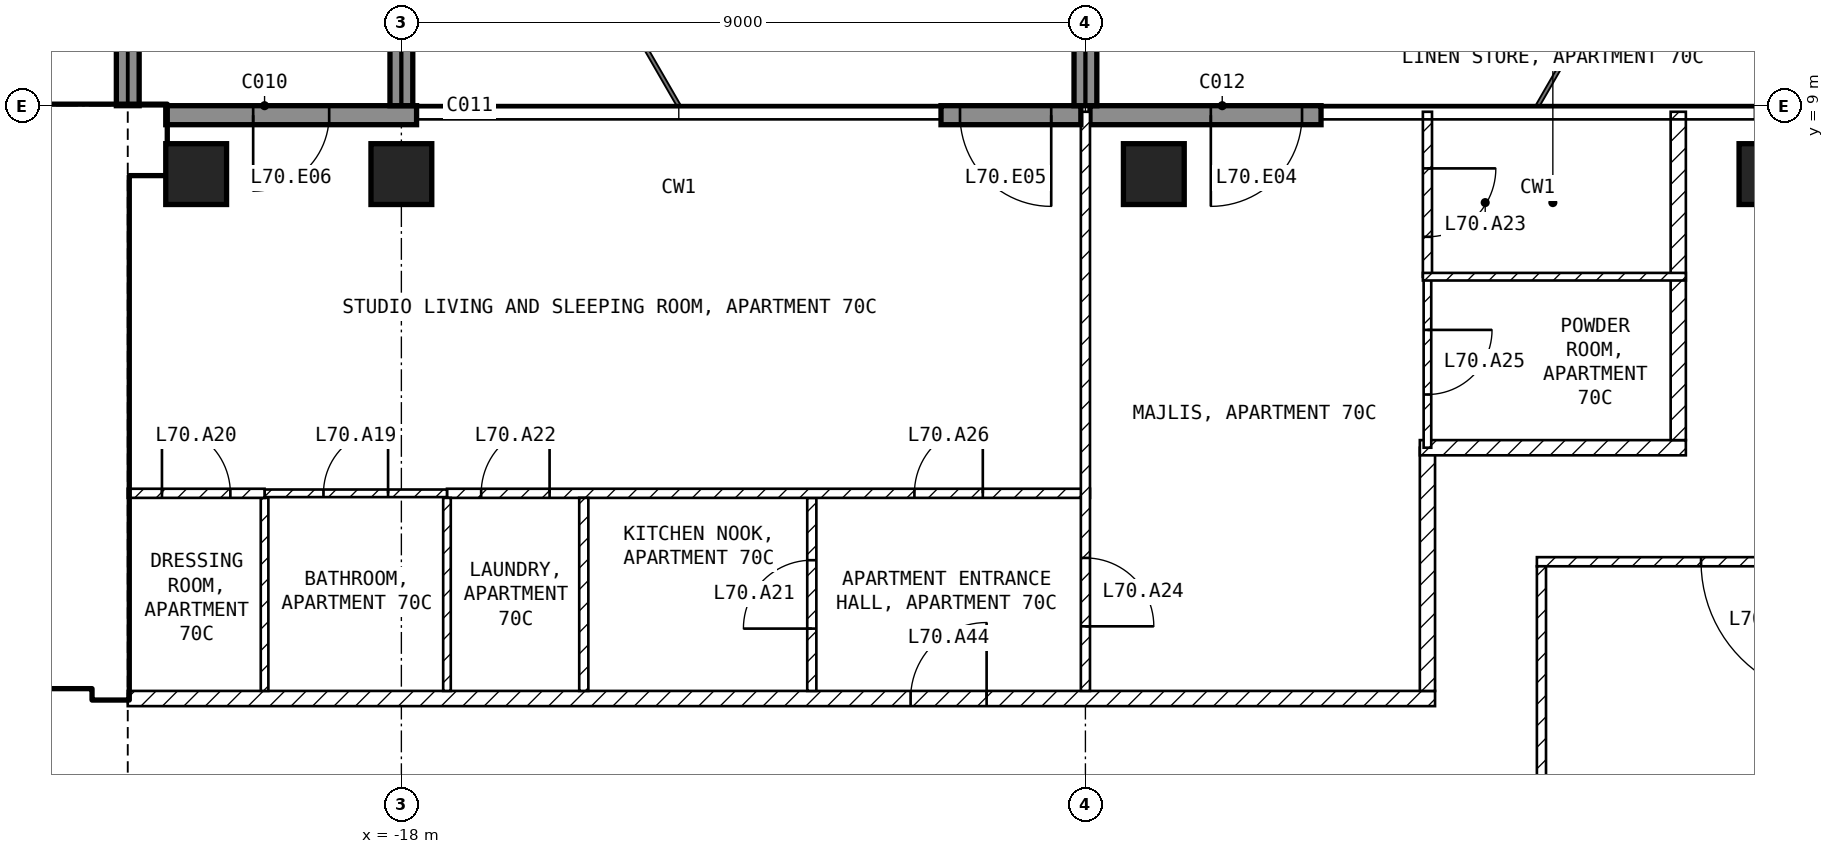
"""IFC4 building model, lengths in metres.
Left out: names, types, materials, properties, quantities, classifications, styles, units other than length and angle.
Written with IfcOpenShell. Run it as: python <this file> out.ifc"""

import sys

from ifc_helpers import new_model, si_unit, direction, frame, frame_2d, origin, origin_2d, place, context, subcontext, project, spatial, rectangle, extrude, element, fill, save


model = new_model("IFC4")
c1 = context("Model", 3, precision=1e-05, world=origin(), true_north=direction((0.0, 1.0)))
c2 = subcontext(c1, "Body", "Model", "MODEL_VIEW")
j1 = project(units=[si_unit("LENGTHUNIT", "METRE"), si_unit("PLANEANGLEUNIT", "RADIAN")], contexts=[c1])
p1 = place(None, origin())
s1 = spatial("IfcSite", under=j1, at=p1, CompositionType="ELEMENT")
p2 = place(p1, origin())
s2 = spatial("IfcBuilding", under=s1, at=p2, CompositionType="ELEMENT")
p3 = place(p2, frame((0.0, 0.0, 274.5)))
s3 = spatial("IfcBuildingStorey", under=s2, at=p3, CompositionType="ELEMENT", Elevation=274.5)
for number, where, z_axis, x_axis in (
    (1, (-20.7, 8.1, -0.25), (0.0, 0.0, 1.0), (1.0, 0.0, 0.0)),
    (2, (-18.0, 8.1, -0.25), (0.0, 0.0, 1.0), (1.0, 0.0, 0.0)),
    (3, (-8.1, 8.1, -0.25), (0.0, 0.0, 1.0), (1.0, 0.0, 0.0)),
    (4, (0.0, 8.1, -0.25), (0.0, 0.0, 1.0), (1.0, 0.0, 0.0)),
):
    element("IfcColumn", number, at=place(p3, frame(where, z_axis=z_axis, x_axis=x_axis)), inside=s3, PredefinedType="COLUMN", context=c2, shape_type="SweptSolid", body=[
        extrude(rectangle(XDim=0.8, YDim=0.8, at=origin_2d()), origin(), (0.0, 0.0, 1.0), 3.5),
    ])
p4 = place(p3, frame((-5.9, 8.875, 0.0), z_axis=(0.0, 0.0, 1.0), x_axis=(-1.0, 0.0, 0.0)))
e5 = element("IfcWall", 5, at=p4, inside=s3, PredefinedType="SOLIDWALL", context=c2, shape_type="SweptSolid", body=[
    extrude(rectangle(XDim=3.04, YDim=0.25, at=frame_2d((1.52, 0.0))), origin(), (0.0, 0.0, 1.0), 3.25),
])
p5 = place(p4, frame((0.25, 0.0, 0.0)))
e6 = element("IfcOpeningElement", 6, at=p5, cuts=e5, PredefinedType="OPENING", context=c2, shape_type="SweptSolid", body=[
    extrude(rectangle(XDim=1.2, YDim=2.4, at=frame_2d((0.6, 1.2))), frame((0.0, 0.135, 0.0), z_axis=(0.0, -1.0, 0.0), x_axis=(1.0, 0.0, 0.0)), (0.0, 0.0, 1.0), 0.27),
])
p6 = place(p3, frame((-9.06, 8.875, 0.0), z_axis=(0.0, 0.0, 1.0), x_axis=(-1.0, 0.0, 0.0)))
e7 = element("IfcWall", 7, at=p6, inside=s3, PredefinedType="SOLIDWALL", context=c2, shape_type="SweptSolid", body=[
    extrude(rectangle(XDim=1.84, YDim=0.25, at=frame_2d((0.92, 0.0))), origin(), (0.0, 0.0, 1.0), 3.25),
])
p7 = place(p6, frame((0.39, 0.0, 0.0)))
e8 = element("IfcOpeningElement", 8, at=p7, cuts=e7, PredefinedType="OPENING", context=c2, shape_type="SweptSolid", body=[
    extrude(rectangle(XDim=1.2, YDim=2.4, at=frame_2d((0.6, 1.2))), frame((0.0, 0.135, 0.0), z_axis=(0.0, -1.0, 0.0), x_axis=(1.0, 0.0, 0.0)), (0.0, 0.0, 1.0), 0.27),
])
p8 = place(p3, frame((-17.8, 8.875, 0.0), z_axis=(0.0, 0.0, 1.0), x_axis=(-1.0, 0.0, 0.0)))
e9 = element("IfcWall", 9, at=p8, inside=s3, PredefinedType="SOLIDWALL", context=c2, shape_type="SweptSolid", body=[
    extrude(rectangle(XDim=3.3, YDim=0.25, at=frame_2d((1.65, 0.0))), origin(), (0.0, 0.0, 1.0), 3.25),
])
p9 = place(p8, frame((1.15, 0.0, 0.0)))
e10 = element("IfcOpeningElement", 10, at=p9, cuts=e9, PredefinedType="OPENING", context=c2, shape_type="SweptSolid", body=[
    extrude(rectangle(XDim=1.0, YDim=2.4, at=frame_2d((0.5, 1.2))), frame((0.0, 0.135, 0.0), z_axis=(0.0, -1.0, 0.0), x_axis=(1.0, 0.0, 0.0)), (0.0, 0.0, 1.0), 0.27),
])
for number, where, z_axis, x_axis in (
    (11, (-21.6, 9.0, 0.0), (0.0, 0.0, 1.0), (0.0, 1.0, 0.0)),
    (12, (-18.0, 9.0, 0.0), (0.0, 0.0, 1.0), (0.0, 1.0, 0.0)),
    (13, (-9.0, 9.0, 0.0), (0.0, 0.0, 1.0), (0.0, 1.0, 0.0)),
):
    element("IfcWall", number, at=place(p3, frame(where, z_axis=z_axis, x_axis=x_axis)), inside=s3, PredefinedType="SOLIDWALL", context=c2, shape_type="SweptSolid", body=[
        extrude(rectangle(XDim=2.7, YDim=0.3, at=frame_2d((1.35, 0.0))), origin(), (0.0, 0.0, 1.0), 3.25),
    ])
p10 = place(p3, frame((-29.75, 8.55, 0.0), z_axis=(0.0, 0.0, 1.0), x_axis=(1.0, 0.0, 0.0)))
e14 = element("IfcWall", 14, at=p10, inside=s3, PredefinedType="SHEAR", context=c2, shape_type="SweptSolid", body=[
    extrude(rectangle(XDim=8.65, YDim=0.9, at=frame_2d((4.325, 0.0))), origin(), (0.0, 0.0, 1.0), 3.25),
])
p11 = place(p3, frame((-21.825, 1.2, 0.0), z_axis=(0.0, 0.0, 1.0), x_axis=(0.0, 1.0, 0.0)))
e15 = element("IfcWall", 15, at=p11, inside=s3, PredefinedType="SHEAR", context=c2, shape_type="SweptSolid", body=[
    extrude(rectangle(XDim=6.9, YDim=0.45, at=frame_2d((3.45, 0.0))), origin(), (0.0, 0.0, 1.0), 3.25),
])
p12 = place(p3, frame((-33.35, 1.45, 0.0), z_axis=(0.0, 0.0, 1.0), x_axis=(1.0, 0.0, 0.0)))
e16 = element("IfcWall", 16, at=p12, inside=s3, PredefinedType="SOLIDWALL", context=c2, shape_type="SweptSolid", body=[
    extrude(rectangle(XDim=11.3, YDim=0.2, at=frame_2d((5.65, 0.0))), origin(), (0.0, 0.0, 1.0), 3.25),
])
p13 = place(p12, frame((9.55, 0.0, 0.0)))
e17 = element("IfcOpeningElement", 17, at=p13, cuts=e16, PredefinedType="OPENING", context=c2, shape_type="SweptSolid", body=[
    extrude(rectangle(XDim=1.0, YDim=2.1, at=frame_2d((0.5, 1.05))), frame((0.0, 0.11, 0.0), z_axis=(0.0, -1.0, 0.0), x_axis=(1.0, 0.0, 0.0)), (0.0, 0.0, 1.0), 0.22),
])
p14 = place(p12, frame((7.05, 0.0, 0.0)))
e18 = element("IfcOpeningElement", 18, at=p14, cuts=e16, PredefinedType="OPENING", context=c2, shape_type="SweptSolid", body=[
    extrude(rectangle(XDim=1.0, YDim=2.1, at=frame_2d((0.5, 1.05))), frame((0.0, 0.11, 0.0), z_axis=(0.0, -1.0, 0.0), x_axis=(1.0, 0.0, 0.0)), (0.0, 0.0, 1.0), 0.22),
])
p15 = place(p12, frame((1.175, 0.0, 0.0)))
e19 = element("IfcOpeningElement", 19, at=p15, cuts=e16, PredefinedType="OPENING", context=c2, shape_type="SweptSolid", body=[
    extrude(rectangle(XDim=0.9, YDim=2.1, at=frame_2d((0.45, 1.05))), frame((0.0, 0.11, 0.0), z_axis=(0.0, -1.0, 0.0), x_axis=(1.0, 0.0, 0.0)), (0.0, 0.0, 1.0), 0.22),
])
p16 = place(p3, frame((-28.35, 5.15, 0.0), z_axis=(0.0, 0.0, 1.0), x_axis=(1.0, 0.0, 0.0)))
e20 = element("IfcWall", 20, at=p16, inside=s3, PredefinedType="SOLIDWALL", context=c2, shape_type="SweptSolid", body=[
    extrude(rectangle(XDim=6.3, YDim=0.2, at=frame_2d((3.15, 0.0))), origin(), (0.0, 0.0, 1.0), 3.25),
])
p17 = place(p16, frame((5.1, 0.0, 0.0)))
e21 = element("IfcOpeningElement", 21, at=p17, cuts=e20, PredefinedType="OPENING", context=c2, shape_type="SweptSolid", body=[
    extrude(rectangle(XDim=1.0, YDim=2.1, at=frame_2d((0.5, 1.05))), frame((0.0, 0.11, 0.0), z_axis=(0.0, -1.0, 0.0), x_axis=(1.0, 0.0, 0.0)), (0.0, 0.0, 1.0), 0.22),
])
p18 = place(p3, frame((3.06, 3.0, 0.0), z_axis=(0.0, 0.0, 1.0), x_axis=(-1.0, 0.0, 0.0)))
e22 = element("IfcWall", 22, at=p18, inside=s3, PredefinedType="PARTITIONING", context=c2, shape_type="SweptSolid", body=[
    extrude(rectangle(XDim=6.12, YDim=0.12, at=frame_2d((3.06, 0.0))), origin(), (0.0, 0.0, 1.0), 3.25),
])
p19 = place(p18, frame((2.16, 0.0, 0.0)))
e23 = element("IfcOpeningElement", 23, at=p19, cuts=e22, PredefinedType="OPENING", context=c2, shape_type="SweptSolid", body=[
    extrude(rectangle(XDim=1.8, YDim=2.1, at=frame_2d((0.9, 1.05))), frame((0.0, 0.07, 0.0), z_axis=(0.0, -1.0, 0.0), x_axis=(1.0, 0.0, 0.0)), (0.0, 0.0, 1.0), 0.14),
])
p20 = place(p3, frame((-3.0, 2.94, 0.0), z_axis=(0.0, 0.0, 1.0), x_axis=(0.0, -1.0, 0.0)))
e24 = element("IfcWall", 24, at=p20, inside=s3, PredefinedType="PARTITIONING", context=c2, shape_type="SweptSolid", body=[
    extrude(rectangle(XDim=5.88, YDim=0.12, at=frame_2d((2.94, 0.0))), origin(), (0.0, 0.0, 1.0), 3.25),
])
p21 = place(p3, frame((-21.6, 1.2, 0.0), z_axis=(0.0, 0.0, 1.0), x_axis=(1.0, 0.0, 0.0)))
e25 = element("IfcWall", 25, at=p21, inside=s3, PredefinedType="PARTITIONING", context=c2, shape_type="SweptSolid", body=[
    extrude(rectangle(XDim=17.2, YDim=0.2, at=frame_2d((8.6, 0.0))), origin(), (0.0, 0.0, 1.0), 3.25),
])
p22 = place(p21, frame((10.3, 0.0, 0.0)))
e26 = element("IfcOpeningElement", 26, at=p22, cuts=e25, PredefinedType="OPENING", context=c2, shape_type="SweptSolid", body=[
    extrude(rectangle(XDim=1.0, YDim=2.1, at=frame_2d((0.5, 1.05))), frame((0.0, 0.11, 0.0), z_axis=(0.0, -1.0, 0.0), x_axis=(1.0, 0.0, 0.0)), (0.0, 0.0, 1.0), 0.22),
])
p23 = place(p3, frame((-4.5, 1.3, 0.0), z_axis=(0.0, 0.0, 1.0), x_axis=(0.0, 1.0, 0.0)))
e27 = element("IfcWall", 27, at=p23, inside=s3, PredefinedType="PARTITIONING", context=c2, shape_type="SweptSolid", body=[
    extrude(rectangle(XDim=3.2, YDim=0.2, at=frame_2d((1.6, 0.0))), origin(), (0.0, 0.0, 1.0), 3.25),
])
p24 = place(p3, frame((-4.6, 4.5, 0.0), z_axis=(0.0, 0.0, 1.0), x_axis=(1.0, 0.0, 0.0)))
e28 = element("IfcWall", 28, at=p24, inside=s3, PredefinedType="PARTITIONING", context=c2, shape_type="SweptSolid", body=[
    extrude(rectangle(XDim=3.5, YDim=0.2, at=frame_2d((1.75, 0.0))), origin(), (0.0, 0.0, 1.0), 3.25),
])
p25 = place(p3, frame((-1.2, 4.6, 0.0), z_axis=(0.0, 0.0, 1.0), x_axis=(0.0, 1.0, 0.0)))
e29 = element("IfcWall", 29, at=p25, inside=s3, PredefinedType="PARTITIONING", context=c2, shape_type="SweptSolid", body=[
    extrude(rectangle(XDim=4.32, YDim=0.2, at=frame_2d((2.16, 0.0))), origin(), (0.0, 0.0, 1.0), 3.25),
])
p26 = place(p3, frame((-12.6, 1.3, 0.0), z_axis=(0.0, 0.0, 1.0), x_axis=(0.0, 1.0, 0.0)))
e30 = element("IfcWall", 30, at=p26, inside=s3, PredefinedType="PARTITIONING", context=c2, shape_type="SweptSolid", body=[
    extrude(rectangle(XDim=2.54, YDim=0.12, at=frame_2d((1.27, 0.0))), origin(), (0.0, 0.0, 1.0), 3.25),
])
p27 = place(p26, frame((0.82, 0.0, 0.0)))
e31 = element("IfcOpeningElement", 31, at=p27, cuts=e30, PredefinedType="OPENING", context=c2, shape_type="SweptSolid", body=[
    extrude(rectangle(XDim=0.9, YDim=2.1, at=frame_2d((0.45, 1.05))), frame((0.0, 0.07, 0.0), z_axis=(0.0, -1.0, 0.0), x_axis=(1.0, 0.0, 0.0)), (0.0, 0.0, 1.0), 0.14),
])
p28 = place(p3, frame((-17.4, 3.9, 0.0), z_axis=(0.0, 0.0, 1.0), x_axis=(1.0, 0.0, 0.0)))
e32 = element("IfcWall", 32, at=p28, inside=s3, PredefinedType="PARTITIONING", context=c2, shape_type="SweptSolid", body=[
    extrude(rectangle(XDim=8.46, YDim=0.12, at=frame_2d((4.23, 0.0))), origin(), (0.0, 0.0, 1.0), 3.25),
])
p29 = place(p28, frame((0.45, 0.0, 0.0)))
e33 = element("IfcOpeningElement", 33, at=p29, cuts=e32, PredefinedType="OPENING", context=c2, shape_type="SweptSolid", body=[
    extrude(rectangle(XDim=0.9, YDim=2.1, at=frame_2d((0.45, 1.05))), frame((0.0, 0.07, 0.0), z_axis=(0.0, -1.0, 0.0), x_axis=(1.0, 0.0, 0.0)), (0.0, 0.0, 1.0), 0.14),
])
p30 = place(p28, frame((6.15, 0.0, 0.0)))
e34 = element("IfcOpeningElement", 34, at=p30, cuts=e32, PredefinedType="OPENING", context=c2, shape_type="SweptSolid", body=[
    extrude(rectangle(XDim=0.9, YDim=2.1, at=frame_2d((0.45, 1.05))), frame((0.0, 0.07, 0.0), z_axis=(0.0, -1.0, 0.0), x_axis=(1.0, 0.0, 0.0)), (0.0, 0.0, 1.0), 0.14),
])
p31 = place(p3, frame((-9.0, 8.92, 0.0), z_axis=(0.0, 0.0, 1.0), x_axis=(0.0, -1.0, 0.0)))
e35 = element("IfcWall", 35, at=p31, inside=s3, PredefinedType="PARTITIONING", context=c2, shape_type="SweptSolid", body=[
    extrude(rectangle(XDim=7.62, YDim=0.12, at=frame_2d((3.81, 0.0))), origin(), (0.0, 0.0, 1.0), 3.25),
])
p32 = place(p31, frame((5.87, 0.0, 0.0)))
e36 = element("IfcOpeningElement", 36, at=p32, cuts=e35, PredefinedType="OPENING", context=c2, shape_type="SweptSolid", body=[
    extrude(rectangle(XDim=0.9, YDim=2.1, at=frame_2d((0.45, 1.05))), frame((0.0, 0.07, 0.0), z_axis=(0.0, -1.0, 0.0), x_axis=(1.0, 0.0, 0.0)), (0.0, 0.0, 1.0), 0.14),
])
p33 = place(p3, frame((-15.6, 1.3, 0.0), z_axis=(0.0, 0.0, 1.0), x_axis=(0.0, 1.0, 0.0)))
e37 = element("IfcWall", 37, at=p33, inside=s3, PredefinedType="PARTITIONING", context=c2, shape_type="SweptSolid", body=[
    extrude(rectangle(XDim=2.54, YDim=0.12, at=frame_2d((1.27, 0.0))), origin(), (0.0, 0.0, 1.0), 3.25),
])
for number, where, z_axis, x_axis in (
    (38, (-17.4, 1.3, 0.0), (0.0, 0.0, 1.0), (0.0, 1.0, 0.0)),
    (39, (-19.8, 1.3, 0.0), (0.0, 0.0, 1.0), (0.0, 1.0, 0.0)),
):
    element("IfcWall", number, at=place(p3, frame(where, z_axis=z_axis, x_axis=x_axis)), inside=s3, PredefinedType="PARTITIONING", context=c2, shape_type="SweptSolid", body=[
        extrude(rectangle(XDim=2.54, YDim=0.1, at=frame_2d((1.27, 0.0))), origin(), (0.0, 0.0, 1.0), 3.25),
    ])
p34 = place(p3, frame((-19.8, 3.9, 0.0), z_axis=(0.0, 0.0, 1.0), x_axis=(1.0, 0.0, 0.0)))
e40 = element("IfcWall", 40, at=p34, inside=s3, PredefinedType="PARTITIONING", context=c2, shape_type="SweptSolid", body=[
    extrude(rectangle(XDim=2.4, YDim=0.1, at=frame_2d((1.2, 0.0))), origin(), (0.0, 0.0, 1.0), 3.25),
])
p35 = place(p34, frame((0.775, 0.0, 0.0)))
e41 = element("IfcOpeningElement", 41, at=p35, cuts=e40, PredefinedType="OPENING", context=c2, shape_type="SweptSolid", body=[
    extrude(rectangle(XDim=0.85, YDim=2.1, at=frame_2d((0.425, 1.05))), frame((0.0, 0.06, 0.0), z_axis=(0.0, -1.0, 0.0), x_axis=(1.0, 0.0, 0.0)), (0.0, 0.0, 1.0), 0.12),
])
p36 = place(p3, frame((-21.6, 3.9, 0.0), z_axis=(0.0, 0.0, 1.0), x_axis=(1.0, 0.0, 0.0)))
e42 = element("IfcWall", 42, at=p36, inside=s3, PredefinedType="PARTITIONING", context=c2, shape_type="SweptSolid", body=[
    extrude(rectangle(XDim=1.8, YDim=0.12, at=frame_2d((0.9, 0.0))), origin(), (0.0, 0.0, 1.0), 3.25),
])
p37 = place(p36, frame((0.45, 0.0, 0.0)))
e43 = element("IfcOpeningElement", 43, at=p37, cuts=e42, PredefinedType="OPENING", context=c2, shape_type="SweptSolid", body=[
    extrude(rectangle(XDim=0.9, YDim=2.1, at=frame_2d((0.45, 1.05))), frame((0.0, 0.07, 0.0), z_axis=(0.0, -1.0, 0.0), x_axis=(1.0, 0.0, 0.0)), (0.0, 0.0, 1.0), 0.14),
])
p38 = place(p3, frame((-4.5, 6.75, 0.0), z_axis=(0.0, 0.0, 1.0), x_axis=(0.0, -1.0, 0.0)))
e44 = element("IfcWall", 44, at=p38, inside=s3, PredefinedType="PARTITIONING", context=c2, shape_type="SweptSolid", body=[
    extrude(rectangle(XDim=2.25, YDim=0.1, at=frame_2d((1.125, 0.0))), origin(), (0.0, 0.0, 1.0), 3.25),
])
p39 = place(p38, frame((0.7, 0.0, 0.0)))
e45 = element("IfcOpeningElement", 45, at=p39, cuts=e44, PredefinedType="OPENING", context=c2, shape_type="SweptSolid", body=[
    extrude(rectangle(XDim=0.85, YDim=2.1, at=frame_2d((0.425, 1.05))), frame((0.0, 0.06, 0.0), z_axis=(0.0, -1.0, 0.0), x_axis=(1.0, 0.0, 0.0)), (0.0, 0.0, 1.0), 0.12),
])
p40 = place(p3, frame((-4.5, 8.92, 0.0), z_axis=(0.0, 0.0, 1.0), x_axis=(0.0, -1.0, 0.0)))
e46 = element("IfcWall", 46, at=p40, inside=s3, PredefinedType="PARTITIONING", context=c2, shape_type="SweptSolid", body=[
    extrude(rectangle(XDim=2.17, YDim=0.12, at=frame_2d((1.085, 0.0))), origin(), (0.0, 0.0, 1.0), 3.25),
])
p41 = place(p40, frame((0.745, 0.0, 0.0)))
e47 = element("IfcOpeningElement", 47, at=p41, cuts=e46, PredefinedType="OPENING", context=c2, shape_type="SweptSolid", body=[
    extrude(rectangle(XDim=0.9, YDim=2.1, at=frame_2d((0.45, 1.05))), frame((0.0, 0.07, 0.0), z_axis=(0.0, -1.0, 0.0), x_axis=(1.0, 0.0, 0.0)), (0.0, 0.0, 1.0), 0.14),
])
p42 = place(p3, frame((-4.56, 6.75, 0.0), z_axis=(0.0, 0.0, 1.0), x_axis=(1.0, 0.0, 0.0)))
e48 = element("IfcWall", 48, at=p42, inside=s3, PredefinedType="PARTITIONING", context=c2, shape_type="SweptSolid", body=[
    extrude(rectangle(XDim=3.46, YDim=0.1, at=frame_2d((1.73, 0.0))), origin(), (0.0, 0.0, 1.0), 3.25),
])
p43 = place(p5, origin())
e49 = element("IfcDoor", 49, at=p43, inside=s3, OperationType="SINGLE_SWING_RIGHT", PredefinedType="DOOR", context=c2, shape_type="SweptSolid", body=[
    extrude(rectangle(XDim=1.2, YDim=2.4, at=frame_2d((0.6, 1.2))), frame((0.0, 0.025, 0.0), z_axis=(0.0, -1.0, 0.0), x_axis=(1.0, 0.0, 0.0)), (0.0, 0.0, 1.0), 0.05),
])
fill(e6, e49)
p44 = place(p7, origin())
e50 = element("IfcDoor", 50, at=p44, inside=s3, OperationType="SINGLE_SWING_LEFT", PredefinedType="DOOR", context=c2, shape_type="SweptSolid", body=[
    extrude(rectangle(XDim=1.2, YDim=2.4, at=frame_2d((0.6, 1.2))), frame((0.0, 0.025, 0.0), z_axis=(0.0, -1.0, 0.0), x_axis=(1.0, 0.0, 0.0)), (0.0, 0.0, 1.0), 0.05),
])
fill(e8, e50)
p45 = place(p9, origin())
e51 = element("IfcDoor", 51, at=p45, inside=s3, OperationType="SINGLE_SWING_RIGHT", PredefinedType="DOOR", context=c2, shape_type="SweptSolid", body=[
    extrude(rectangle(XDim=1.0, YDim=2.4, at=frame_2d((0.5, 1.2))), frame((0.0, 0.025, 0.0), z_axis=(0.0, -1.0, 0.0), x_axis=(1.0, 0.0, 0.0)), (0.0, 0.0, 1.0), 0.05),
])
fill(e10, e51)
p46 = place(p17, origin())
e52 = element("IfcDoor", 52, at=p46, inside=s3, OperationType="SINGLE_SWING_LEFT", PredefinedType="DOOR", context=c2, shape_type="SweptSolid", body=[
    extrude(rectangle(XDim=1.0, YDim=2.1, at=frame_2d((0.5, 1.05))), frame((0.0, 0.025, 0.0), z_axis=(0.0, -1.0, 0.0), x_axis=(1.0, 0.0, 0.0)), (0.0, 0.0, 1.0), 0.05),
])
fill(e21, e52)
p47 = place(p19, origin())
e53 = element("IfcDoor", 53, at=p47, inside=s3, OperationType="SINGLE_SWING_LEFT", PredefinedType="DOOR", context=c2, shape_type="SweptSolid", body=[
    extrude(rectangle(XDim=1.8, YDim=2.1, at=frame_2d((0.9, 1.05))), frame((0.0, 0.025, 0.0), z_axis=(0.0, -1.0, 0.0), x_axis=(1.0, 0.0, 0.0)), (0.0, 0.0, 1.0), 0.05),
])
fill(e23, e53)
p48 = place(p35, origin())
e54 = element("IfcDoor", 54, at=p48, inside=s3, OperationType="SINGLE_SWING_RIGHT", PredefinedType="DOOR", context=c2, shape_type="SweptSolid", body=[
    extrude(rectangle(XDim=0.85, YDim=2.1, at=frame_2d((0.425, 1.05))), frame((0.0, 0.025, 0.0), z_axis=(0.0, -1.0, 0.0), x_axis=(1.0, 0.0, 0.0)), (0.0, 0.0, 1.0), 0.05),
])
fill(e41, e54)
p49 = place(p37, origin())
e55 = element("IfcDoor", 55, at=p49, inside=s3, OperationType="SINGLE_SWING_LEFT", PredefinedType="DOOR", context=c2, shape_type="SweptSolid", body=[
    extrude(rectangle(XDim=0.9, YDim=2.1, at=frame_2d((0.45, 1.05))), frame((0.0, 0.025, 0.0), z_axis=(0.0, -1.0, 0.0), x_axis=(1.0, 0.0, 0.0)), (0.0, 0.0, 1.0), 0.05),
])
fill(e43, e55)
p50 = place(p27, origin())
e56 = element("IfcDoor", 56, at=p50, inside=s3, OperationType="SINGLE_SWING_LEFT", PredefinedType="DOOR", context=c2, shape_type="SweptSolid", body=[
    extrude(rectangle(XDim=0.9, YDim=2.1, at=frame_2d((0.45, 1.05))), frame((0.0, 0.025, 0.0), z_axis=(0.0, -1.0, 0.0), x_axis=(1.0, 0.0, 0.0)), (0.0, 0.0, 1.0), 0.05),
])
fill(e31, e56)
p51 = place(p29, origin())
e57 = element("IfcDoor", 57, at=p51, inside=s3, OperationType="SINGLE_SWING_RIGHT", PredefinedType="DOOR", context=c2, shape_type="SweptSolid", body=[
    extrude(rectangle(XDim=0.9, YDim=2.1, at=frame_2d((0.45, 1.05))), frame((0.0, 0.025, 0.0), z_axis=(0.0, -1.0, 0.0), x_axis=(1.0, 0.0, 0.0)), (0.0, 0.0, 1.0), 0.05),
])
fill(e33, e57)
p52 = place(p41, origin())
e58 = element("IfcDoor", 58, at=p52, inside=s3, OperationType="SINGLE_SWING_LEFT", PredefinedType="DOOR", context=c2, shape_type="SweptSolid", body=[
    extrude(rectangle(XDim=0.9, YDim=2.1, at=frame_2d((0.45, 1.05))), frame((0.0, 0.025, 0.0), z_axis=(0.0, -1.0, 0.0), x_axis=(1.0, 0.0, 0.0)), (0.0, 0.0, 1.0), 0.05),
])
fill(e47, e58)
p53 = place(p32, origin())
e59 = element("IfcDoor", 59, at=p53, inside=s3, OperationType="SINGLE_SWING_RIGHT", PredefinedType="DOOR", context=c2, shape_type="SweptSolid", body=[
    extrude(rectangle(XDim=0.9, YDim=2.1, at=frame_2d((0.45, 1.05))), frame((0.0, 0.025, 0.0), z_axis=(0.0, -1.0, 0.0), x_axis=(1.0, 0.0, 0.0)), (0.0, 0.0, 1.0), 0.05),
])
fill(e36, e59)
p54 = place(p39, origin())
e60 = element("IfcDoor", 60, at=p54, inside=s3, OperationType="SINGLE_SWING_LEFT", PredefinedType="DOOR", context=c2, shape_type="SweptSolid", body=[
    extrude(rectangle(XDim=0.85, YDim=2.1, at=frame_2d((0.425, 1.05))), frame((0.0, 0.025, 0.0), z_axis=(0.0, -1.0, 0.0), x_axis=(1.0, 0.0, 0.0)), (0.0, 0.0, 1.0), 0.05),
])
fill(e45, e60)
p55 = place(p30, origin())
e61 = element("IfcDoor", 61, at=p55, inside=s3, OperationType="SINGLE_SWING_RIGHT", PredefinedType="DOOR", context=c2, shape_type="SweptSolid", body=[
    extrude(rectangle(XDim=0.9, YDim=2.1, at=frame_2d((0.45, 1.05))), frame((0.0, 0.025, 0.0), z_axis=(0.0, -1.0, 0.0), x_axis=(1.0, 0.0, 0.0)), (0.0, 0.0, 1.0), 0.05),
])
fill(e34, e61)
p56 = place(p22, origin())
e62 = element("IfcDoor", 62, at=p56, inside=s3, OperationType="SINGLE_SWING_RIGHT", PredefinedType="DOOR", context=c2, shape_type="SweptSolid", body=[
    extrude(rectangle(XDim=1.0, YDim=2.1, at=frame_2d((0.5, 1.05))), frame((0.0, 0.025, 0.0), z_axis=(0.0, -1.0, 0.0), x_axis=(1.0, 0.0, 0.0)), (0.0, 0.0, 1.0), 0.05),
])
fill(e26, e62)
save(model, sys.argv[1])
